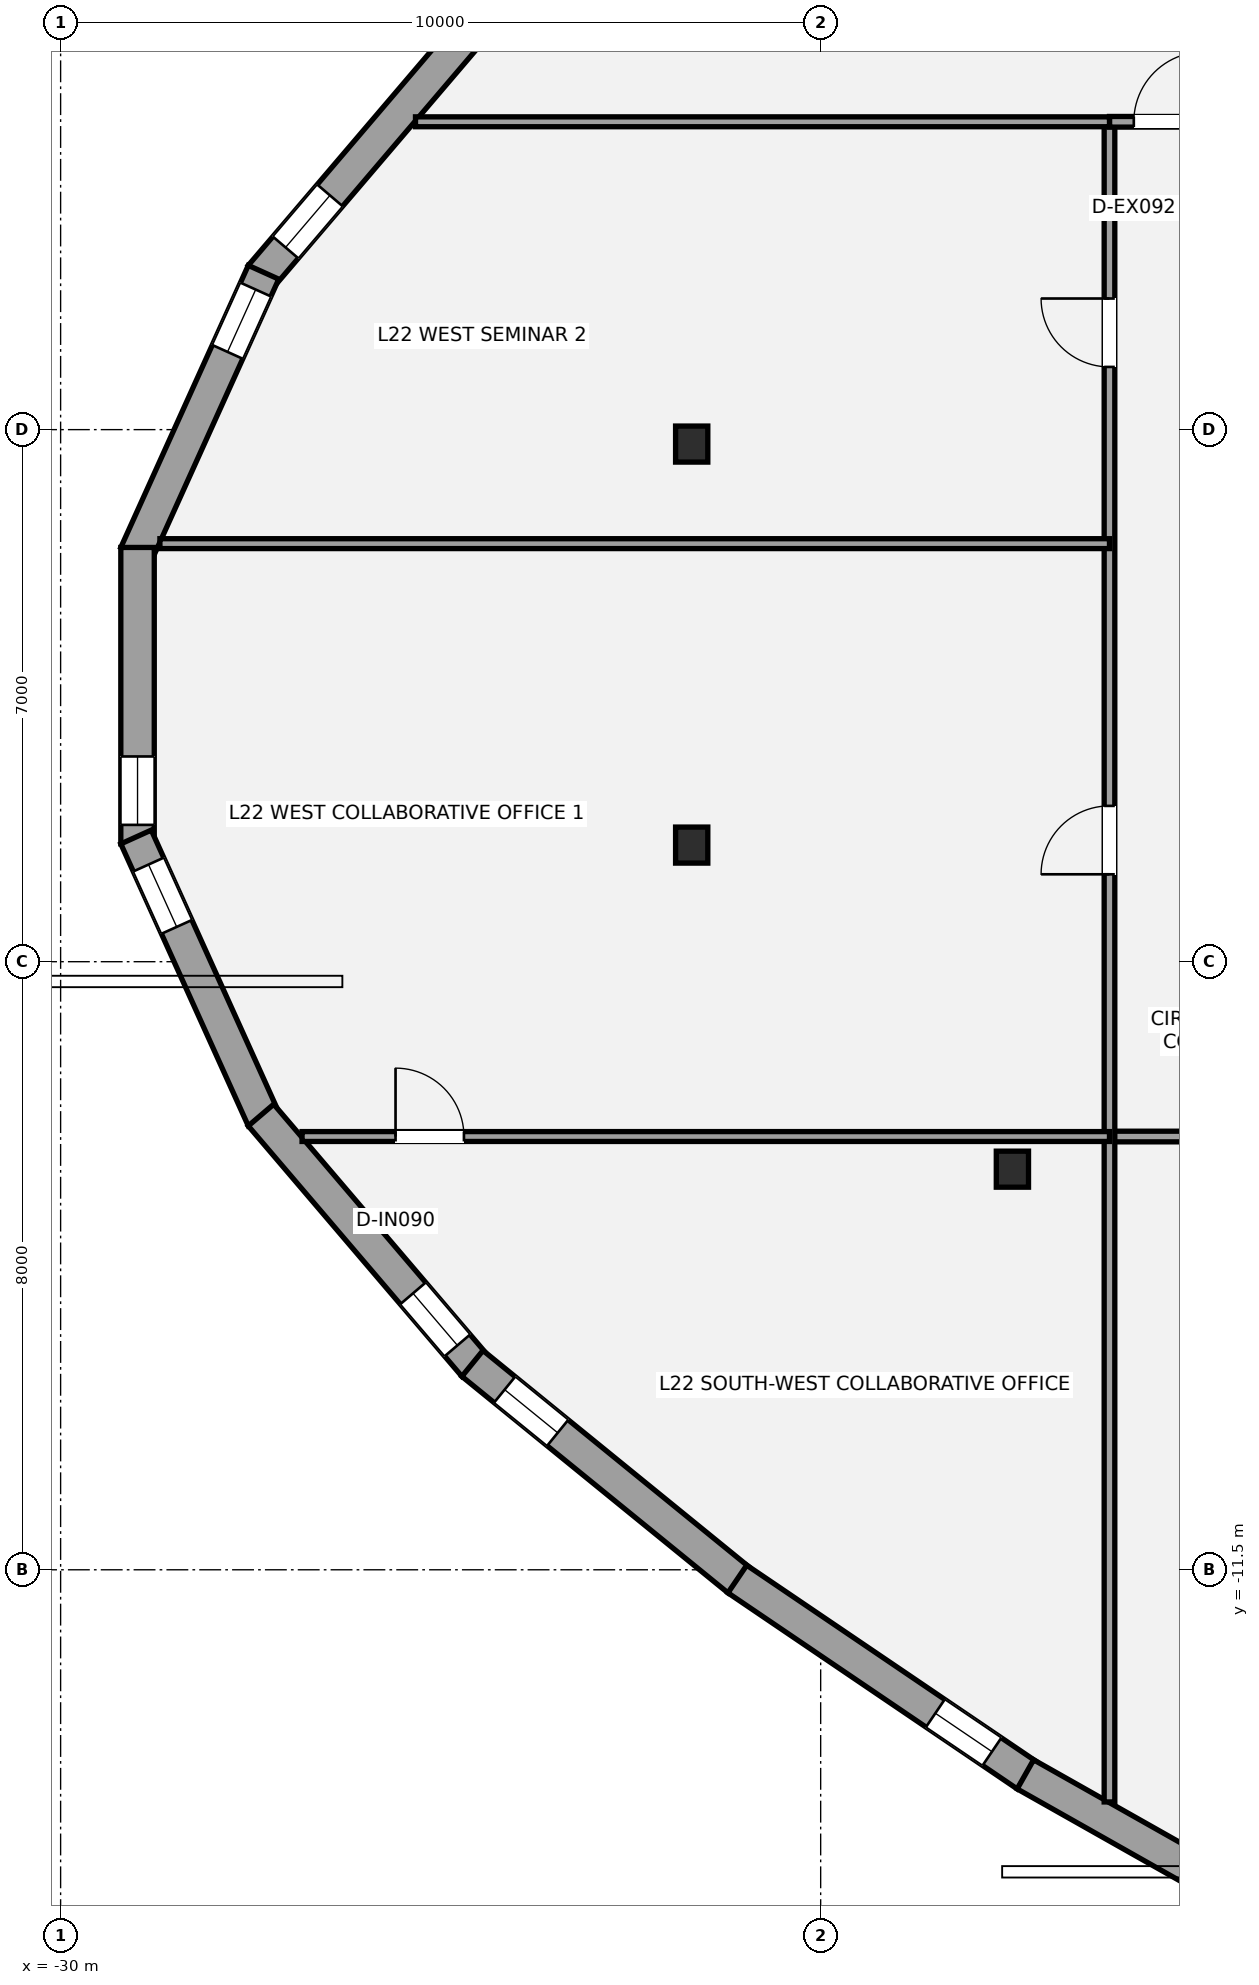
"""IFC4 building model, lengths in metres.
Left out: names, types, materials, properties, quantities, classifications, styles, units other than length and angle.
Written with IfcOpenShell. Run it as: python <this file> out.ifc"""

import sys

from ifc_helpers import new_model, si_unit, direction, frame, frame_2d, origin, origin_2d, place, context, subcontext, project, spatial, rectangle, i_section, extrude, element, fill, save


model = new_model("IFC4")
c1 = context("Model", 3, precision=1e-05, world=origin(), true_north=direction((0.0, 1.0)))
c2 = subcontext(c1, "Body", "Model", "MODEL_VIEW")
j1 = project(units=[si_unit("LENGTHUNIT", "METRE"), si_unit("PLANEANGLEUNIT", "RADIAN")], contexts=[c1])
p1 = place(None, origin())
s1 = spatial("IfcSite", under=j1, at=p1, CompositionType="ELEMENT")
p2 = place(p1, origin())
s2 = spatial("IfcBuilding", under=s1, at=p2, CompositionType="ELEMENT")
p3 = place(p2, frame((0.0, 0.0, 86.1)))
s3 = spatial("IfcBuildingStorey", under=s2, at=p3, CompositionType="ELEMENT", Elevation=86.1)
for number, where, z_axis, x_axis in (
    (1, (-21.697, 3.31, 0.0), (0.0, 0.0, 1.0), (1.0, 0.0, 0.0)),
    (2, (-21.697, -1.966, 0.0), (0.0, 0.0, 1.0), (1.0, 0.0, 0.0)),
    (3, (-17.477, -6.229, 0.0), (0.0, 0.0, 1.0), (1.0, 0.0, 0.0)),
):
    element("IfcColumn", number, at=place(p3, frame(where, z_axis=z_axis, x_axis=x_axis)), inside=s3, PredefinedType="COLUMN", context=c2, shape_type="SweptSolid", body=[
        extrude(i_section(OverallWidth=0.424, OverallDepth=0.474, WebThickness=0.048, FlangeThickness=0.077, at=origin_2d()), origin(), (0.0, 0.0, 1.0), 3.5),
    ])
p4 = place(p3, frame((-27.364, 5.518, 0.0), z_axis=(0.0, 0.0, 1.0), x_axis=(0.648913975558, 0.760861782669, 0.0)))
e4 = element("IfcWall", 4, at=p4, inside=s3, PredefinedType="STANDARD", context=c2, shape_type="SweptSolid", body=[
    extrude(rectangle(XDim=4.331, YDim=0.44, at=frame_2d((2.166, 0.0))), origin(), (0.0, 0.0, 1.0), 2.528),
])
p5 = place(p4, frame((0.498, 0.0, 0.58)))
e5 = element("IfcOpeningElement", 5, at=p5, cuts=e4, PredefinedType="OPENING", context=c2, shape_type="SweptSolid", body=[
    extrude(rectangle(XDim=0.9, YDim=1.35, at=frame_2d((0.45, 0.675))), frame((0.0, 0.23, 0.0), z_axis=(0.0, -1.0, 0.0), x_axis=(1.0, 0.0, 0.0)), (0.0, 0.0, 1.0), 0.46),
])
p6 = place(p3, frame((-29.008, 1.859, 0.0), z_axis=(0.0, 0.0, 1.0), x_axis=(0.411809988363, 0.911269736952, 0.0)))
e6 = element("IfcWall", 6, at=p6, inside=s3, PredefinedType="STANDARD", context=c2, shape_type="SweptSolid", body=[
    extrude(rectangle(XDim=4.072, YDim=0.44, at=frame_2d((2.036, 0.0))), origin(), (0.0, 0.0, 1.0), 2.528),
])
p7 = place(p6, frame((2.923, 0.0, 0.58)))
e7 = element("IfcOpeningElement", 7, at=p7, cuts=e6, PredefinedType="OPENING", context=c2, shape_type="SweptSolid", body=[
    extrude(rectangle(XDim=0.9, YDim=1.35, at=frame_2d((0.45, 0.675))), frame((0.0, 0.23, 0.0), z_axis=(0.0, -1.0, 0.0), x_axis=(1.0, 0.0, 0.0)), (0.0, 0.0, 1.0), 0.46),
])
p8 = place(p3, frame((-28.988, -1.95, 0.0), z_axis=(0.0, 0.0, 1.0), x_axis=(0.0, 1.0, 0.0)))
e8 = element("IfcWall", 8, at=p8, inside=s3, PredefinedType="STANDARD", context=c2, shape_type="SweptSolid", body=[
    extrude(rectangle(XDim=3.9, YDim=0.44, at=frame_2d((1.95, 0.0))), origin(), (0.0, 0.0, 1.0), 2.528),
])
p9 = place(p8, frame((0.25, 0.0, 0.58)))
e9 = element("IfcOpeningElement", 9, at=p9, cuts=e8, PredefinedType="OPENING", context=c2, shape_type="SweptSolid", body=[
    extrude(rectangle(XDim=0.9, YDim=1.35, at=frame_2d((0.45, 0.675))), frame((0.0, 0.23, 0.0), z_axis=(0.0, -1.0, 0.0), x_axis=(1.0, 0.0, 0.0)), (0.0, 0.0, 1.0), 0.46),
])
p10 = place(p3, frame((-27.331, -5.57, 0.0), z_axis=(0.0, 0.0, 1.0), x_axis=(-0.411809988363, 0.911269736952, 0.0)))
e10 = element("IfcWall", 10, at=p10, inside=s3, PredefinedType="STANDARD", context=c2, shape_type="SweptSolid", body=[
    extrude(rectangle(XDim=4.072, YDim=0.44, at=frame_2d((2.036, 0.0))), origin(), (0.0, 0.0, 1.0), 2.528),
])
p11 = place(p10, frame((2.774, 0.0, 0.58)))
e11 = element("IfcOpeningElement", 11, at=p11, cuts=e10, PredefinedType="OPENING", context=c2, shape_type="SweptSolid", body=[
    extrude(rectangle(XDim=0.9, YDim=1.35, at=frame_2d((0.45, 0.675))), frame((0.0, 0.23, 0.0), z_axis=(0.0, -1.0, 0.0), x_axis=(1.0, 0.0, 0.0)), (0.0, 0.0, 1.0), 0.46),
])
p12 = place(p3, frame((-24.553, -8.813, 0.0), z_axis=(0.0, 0.0, 1.0), x_axis=(-0.648913975558, 0.760861782669, 0.0)))
e12 = element("IfcWall", 12, at=p12, inside=s3, PredefinedType="STANDARD", context=c2, shape_type="SweptSolid", body=[
    extrude(rectangle(XDim=4.331, YDim=0.44, at=frame_2d((2.166, 0.0))), origin(), (0.0, 0.0, 1.0), 2.528),
])
p13 = place(p12, frame((0.349, 0.0, 0.58)))
e13 = element("IfcOpeningElement", 13, at=p13, cuts=e12, PredefinedType="OPENING", context=c2, shape_type="SweptSolid", body=[
    extrude(rectangle(XDim=0.9, YDim=1.35, at=frame_2d((0.45, 0.675))), frame((0.0, 0.23, 0.0), z_axis=(0.0, -1.0, 0.0), x_axis=(1.0, 0.0, 0.0)), (0.0, 0.0, 1.0), 0.46),
])
p14 = place(p3, frame((-21.081, -11.633, 0.0), z_axis=(0.0, 0.0, 1.0), x_axis=(-0.775728286929, 0.631067052585, 0.0)))
e14 = element("IfcWall", 14, at=p14, inside=s3, PredefinedType="STANDARD", context=c2, shape_type="SweptSolid", body=[
    extrude(rectangle(XDim=4.513, YDim=0.44, at=frame_2d((2.256, 0.0))), origin(), (0.0, 0.0, 1.0), 2.528),
])
p15 = place(p14, frame((3.067, 0.0, 0.58)))
e15 = element("IfcOpeningElement", 15, at=p15, cuts=e14, PredefinedType="OPENING", context=c2, shape_type="SweptSolid", body=[
    extrude(rectangle(XDim=0.9, YDim=1.35, at=frame_2d((0.45, 0.675))), frame((0.0, 0.23, 0.0), z_axis=(0.0, -1.0, 0.0), x_axis=(1.0, 0.0, 0.0)), (0.0, 0.0, 1.0), 0.46),
])
p16 = place(p3, frame((-17.291, -14.201, 0.0), z_axis=(0.0, 0.0, 1.0), x_axis=(-0.827777061901, 0.561057159112, 0.0)))
e16 = element("IfcWall", 16, at=p16, inside=s3, PredefinedType="STANDARD", context=c2, shape_type="SweptSolid", body=[
    extrude(rectangle(XDim=4.597, YDim=0.44, at=frame_2d((2.298, 0.0))), origin(), (0.0, 0.0, 1.0), 2.528),
])
p17 = place(p16, frame((0.55, 0.0, 0.58)))
e17 = element("IfcOpeningElement", 17, at=p17, cuts=e16, PredefinedType="OPENING", context=c2, shape_type="SweptSolid", body=[
    extrude(rectangle(XDim=0.9, YDim=1.35, at=frame_2d((0.45, 0.675))), frame((0.0, 0.23, 0.0), z_axis=(0.0, -1.0, 0.0), x_axis=(1.0, 0.0, 0.0)), (0.0, 0.0, 1.0), 0.46),
])
p18 = place(p3, frame((-13.105, -16.564, 0.0), z_axis=(0.0, 0.0, 1.0), x_axis=(-0.870732411856, 0.491757121903, 0.0)))
e18 = element("IfcWall", 18, at=p18, inside=s3, PredefinedType="STANDARD", context=c2, shape_type="SweptSolid", body=[
    extrude(rectangle(XDim=4.825, YDim=0.44, at=frame_2d((2.413, 0.0))), origin(), (0.0, 0.0, 1.0), 2.528),
])
p19 = place(p18, frame((0.448, 0.0, 0.58)))
e19 = element("IfcOpeningElement", 19, at=p19, cuts=e18, PredefinedType="OPENING", context=c2, shape_type="SweptSolid", body=[
    extrude(rectangle(XDim=0.9, YDim=1.35, at=frame_2d((0.45, 0.675))), frame((0.0, 0.23, 0.0), z_axis=(0.0, -1.0, 0.0), x_axis=(1.0, 0.0, 0.0)), (0.0, 0.0, 1.0), 0.46),
])
p20 = place(p3, frame((-16.2, -5.8, 0.0), z_axis=(0.0, 0.0, 1.0), x_axis=(1.0, 0.0, 0.0)))
e20 = element("IfcWall", 20, at=p20, inside=s3, PredefinedType="PARTITIONING", context=c2, shape_type="SweptSolid", body=[
    extrude(rectangle(XDim=32.4, YDim=0.14, at=frame_2d((16.2, 0.0))), origin(), (0.0, 0.0, 1.0), 2.763),
])
p21 = place(p20, frame((4.25, 0.0, 0.0)))
e21 = element("IfcOpeningElement", 21, at=p21, cuts=e20, PredefinedType="OPENING", context=c2, shape_type="SweptSolid", body=[
    extrude(rectangle(XDim=0.9, YDim=2.1, at=frame_2d((0.45, 1.05))), frame((0.0, 0.08, 0.0), z_axis=(0.0, -1.0, 0.0), x_axis=(1.0, 0.0, 0.0)), (0.0, 0.0, 1.0), 0.16),
])
p22 = place(p20, frame((13.15, 0.0, 0.0)))
e22 = element("IfcOpeningElement", 22, at=p22, cuts=e20, PredefinedType="OPENING", context=c2, shape_type="SweptSolid", body=[
    extrude(rectangle(XDim=1.5, YDim=2.15, at=frame_2d((0.75, 1.075))), frame((0.0, 0.08, 0.0), z_axis=(0.0, -1.0, 0.0), x_axis=(1.0, 0.0, 0.0)), (0.0, 0.0, 1.0), 0.16),
])
p23 = place(p20, frame((21.45, 0.0, 0.0)))
e23 = element("IfcOpeningElement", 23, at=p23, cuts=e20, PredefinedType="OPENING", context=c2, shape_type="SweptSolid", body=[
    extrude(rectangle(XDim=0.9, YDim=2.1, at=frame_2d((0.45, 1.05))), frame((0.0, 0.08, 0.0), z_axis=(0.0, -1.0, 0.0), x_axis=(1.0, 0.0, 0.0)), (0.0, 0.0, 1.0), 0.16),
])
p24 = place(p20, frame((28.15, 0.0, 0.0)))
e24 = element("IfcOpeningElement", 24, at=p24, cuts=e20, PredefinedType="OPENING", context=c2, shape_type="SweptSolid", body=[
    extrude(rectangle(XDim=1.5, YDim=2.15, at=frame_2d((0.75, 1.075))), frame((0.0, 0.08, 0.0), z_axis=(0.0, -1.0, 0.0), x_axis=(1.0, 0.0, 0.0)), (0.0, 0.0, 1.0), 0.16),
])
p25 = place(p3, frame((-16.2, -14.554, 0.0), z_axis=(0.0, 0.0, 1.0), x_axis=(0.0, 1.0, 0.0)))
e25 = element("IfcWall", 25, at=p25, inside=s3, PredefinedType="PARTITIONING", context=c2, shape_type="SweptSolid", body=[
    extrude(rectangle(XDim=22.104, YDim=0.14, at=frame_2d((11.052, 0.0))), origin(), (0.0, 0.0, 1.0), 2.751),
])
p26 = place(p25, frame((12.204, 0.0, 0.0)))
e26 = element("IfcOpeningElement", 26, at=p26, cuts=e25, PredefinedType="OPENING", context=c2, shape_type="SweptSolid", body=[
    extrude(rectangle(XDim=0.9, YDim=2.1, at=frame_2d((0.45, 1.05))), frame((0.0, 0.08, 0.0), z_axis=(0.0, -1.0, 0.0), x_axis=(1.0, 0.0, 0.0)), (0.0, 0.0, 1.0), 0.16),
])
p27 = place(p25, frame((18.879, 0.0, 0.0)))
e27 = element("IfcOpeningElement", 27, at=p27, cuts=e25, PredefinedType="OPENING", context=c2, shape_type="SweptSolid", body=[
    extrude(rectangle(XDim=0.9, YDim=2.1, at=frame_2d((0.45, 1.05))), frame((0.0, 0.08, 0.0), z_axis=(0.0, -1.0, 0.0), x_axis=(1.0, 0.0, 0.0)), (0.0, 0.0, 1.0), 0.16),
])
p28 = place(p3, frame((-16.2, 7.55, 0.0), z_axis=(0.0, 0.0, 1.0), x_axis=(1.0, 0.0, 0.0)))
e28 = element("IfcWall", 28, at=p28, inside=s3, PredefinedType="PARTITIONING", context=c2, shape_type="SweptSolid", body=[
    extrude(rectangle(XDim=2.3, YDim=0.14, at=frame_2d((1.15, 0.0))), origin(), (0.0, 0.0, 1.0), 2.763),
])
p29 = place(p28, frame((0.32, 0.0, 0.0)))
e29 = element("IfcOpeningElement", 29, at=p29, cuts=e28, PredefinedType="OPENING", context=c2, shape_type="SweptSolid", body=[
    extrude(rectangle(XDim=0.92, YDim=2.15, at=frame_2d((0.46, 1.075))), frame((0.0, 0.08, 0.0), z_axis=(0.0, -1.0, 0.0), x_axis=(1.0, 0.0, 0.0)), (0.0, 0.0, 1.0), 0.16),
])
p30 = place(p3, frame((-25.331, 7.55, 0.0), z_axis=(0.0, 0.0, 1.0), x_axis=(1.0, 0.0, 0.0)))
e30 = element("IfcWall", 30, at=p30, inside=s3, PredefinedType="PARTITIONING", context=c2, shape_type="SweptSolid", body=[
    extrude(rectangle(XDim=9.131, YDim=0.13, at=frame_2d((4.565, 0.0))), origin(), (0.0, 0.0, 1.0), 2.763),
])
p31 = place(p3, frame((-26.823, -5.8, 0.0), z_axis=(0.0, 0.0, 1.0), x_axis=(1.0, 0.0, 0.0)))
e31 = element("IfcWall", 31, at=p31, inside=s3, PredefinedType="PARTITIONING", context=c2, shape_type="SweptSolid", body=[
    extrude(rectangle(XDim=10.624, YDim=0.13, at=frame_2d((5.312, 0.0))), origin(), (0.0, 0.0, 1.0), 2.688),
])
p32 = place(p31, frame((1.23, 0.0, 0.0)))
e32 = element("IfcOpeningElement", 32, at=p32, cuts=e31, PredefinedType="OPENING", context=c2, shape_type="SweptSolid", body=[
    extrude(rectangle(XDim=0.9, YDim=2.1, at=frame_2d((0.45, 1.05))), frame((0.0, 0.075, 0.0), z_axis=(0.0, -1.0, 0.0), x_axis=(1.0, 0.0, 0.0)), (0.0, 0.0, 1.0), 0.15),
])
p33 = place(p3, frame((-28.694, 2.0, 0.0), z_axis=(0.0, 0.0, 1.0), x_axis=(1.0, 0.0, 0.0)))
e33 = element("IfcWall", 33, at=p33, inside=s3, PredefinedType="PARTITIONING", context=c2, shape_type="SweptSolid", body=[
    extrude(rectangle(XDim=12.494, YDim=0.13, at=frame_2d((6.247, 0.0))), origin(), (0.0, 0.0, 1.0), 2.751),
])
p34 = place(p5, origin())
e34 = element("IfcWindow", 34, at=p34, inside=s3, PartitioningType="SINGLE_PANEL", PredefinedType="WINDOW", context=c2, shape_type="SweptSolid", body=[
    extrude(rectangle(XDim=0.9, YDim=1.35, at=frame_2d((0.45, 0.675))), frame((0.0, -0.01, 0.0), z_axis=(0.0, -1.0, 0.0), x_axis=(1.0, 0.0, 0.0)), (0.0, 0.0, 1.0), 0.06),
])
fill(e5, e34)
p35 = place(p7, origin())
e35 = element("IfcWindow", 35, at=p35, inside=s3, PartitioningType="SINGLE_PANEL", PredefinedType="WINDOW", context=c2, shape_type="SweptSolid", body=[
    extrude(rectangle(XDim=0.9, YDim=1.35, at=frame_2d((0.45, 0.675))), frame((0.0, -0.01, 0.0), z_axis=(0.0, -1.0, 0.0), x_axis=(1.0, 0.0, 0.0)), (0.0, 0.0, 1.0), 0.06),
])
fill(e7, e35)
p36 = place(p9, origin())
e36 = element("IfcWindow", 36, at=p36, inside=s3, PartitioningType="SINGLE_PANEL", PredefinedType="WINDOW", context=c2, shape_type="SweptSolid", body=[
    extrude(rectangle(XDim=0.9, YDim=1.35, at=frame_2d((0.45, 0.675))), frame((0.0, -0.01, 0.0), z_axis=(0.0, -1.0, 0.0), x_axis=(1.0, 0.0, 0.0)), (0.0, 0.0, 1.0), 0.06),
])
fill(e9, e36)
p37 = place(p11, origin())
e37 = element("IfcWindow", 37, at=p37, inside=s3, PartitioningType="SINGLE_PANEL", PredefinedType="WINDOW", context=c2, shape_type="SweptSolid", body=[
    extrude(rectangle(XDim=0.9, YDim=1.35, at=frame_2d((0.45, 0.675))), frame((0.0, -0.01, 0.0), z_axis=(0.0, -1.0, 0.0), x_axis=(1.0, 0.0, 0.0)), (0.0, 0.0, 1.0), 0.06),
])
fill(e11, e37)
p38 = place(p13, origin())
e38 = element("IfcWindow", 38, at=p38, inside=s3, PartitioningType="SINGLE_PANEL", PredefinedType="WINDOW", context=c2, shape_type="SweptSolid", body=[
    extrude(rectangle(XDim=0.9, YDim=1.35, at=frame_2d((0.45, 0.675))), frame((0.0, -0.01, 0.0), z_axis=(0.0, -1.0, 0.0), x_axis=(1.0, 0.0, 0.0)), (0.0, 0.0, 1.0), 0.06),
])
fill(e13, e38)
p39 = place(p15, origin())
e39 = element("IfcWindow", 39, at=p39, inside=s3, PartitioningType="SINGLE_PANEL", PredefinedType="WINDOW", context=c2, shape_type="SweptSolid", body=[
    extrude(rectangle(XDim=0.9, YDim=1.35, at=frame_2d((0.45, 0.675))), frame((0.0, -0.01, 0.0), z_axis=(0.0, -1.0, 0.0), x_axis=(1.0, 0.0, 0.0)), (0.0, 0.0, 1.0), 0.06),
])
fill(e15, e39)
p40 = place(p17, origin())
e40 = element("IfcWindow", 40, at=p40, inside=s3, PartitioningType="SINGLE_PANEL", PredefinedType="WINDOW", context=c2, shape_type="SweptSolid", body=[
    extrude(rectangle(XDim=0.9, YDim=1.35, at=frame_2d((0.45, 0.675))), frame((0.0, -0.01, 0.0), z_axis=(0.0, -1.0, 0.0), x_axis=(1.0, 0.0, 0.0)), (0.0, 0.0, 1.0), 0.06),
])
fill(e17, e40)
p41 = place(p29, origin())
e41 = element("IfcDoor", 41, at=p41, inside=s3, OperationType="SINGLE_SWING_RIGHT", PredefinedType="DOOR", context=c2, shape_type="SweptSolid", body=[
    extrude(rectangle(XDim=0.92, YDim=2.15, at=frame_2d((0.46, 1.075))), frame((0.0, 0.025, 0.0), z_axis=(0.0, -1.0, 0.0), x_axis=(1.0, 0.0, 0.0)), (0.0, 0.0, 1.0), 0.05),
])
fill(e29, e41)
p42 = place(p32, origin())
e42 = element("IfcDoor", 42, at=p42, inside=s3, OperationType="SINGLE_SWING_LEFT", PredefinedType="DOOR", context=c2, shape_type="SweptSolid", body=[
    extrude(rectangle(XDim=0.9, YDim=2.1, at=frame_2d((0.45, 1.05))), frame((0.0, 0.025, 0.0), z_axis=(0.0, -1.0, 0.0), x_axis=(1.0, 0.0, 0.0)), (0.0, 0.0, 1.0), 0.05),
])
fill(e32, e42)
p43 = place(p26, origin())
e43 = element("IfcDoor", 43, at=p43, inside=s3, OperationType="SINGLE_SWING_LEFT", PredefinedType="DOOR", context=c2, shape_type="SweptSolid", body=[
    extrude(rectangle(XDim=0.9, YDim=2.1, at=frame_2d((0.45, 1.05))), frame((0.0, 0.025, 0.0), z_axis=(0.0, -1.0, 0.0), x_axis=(1.0, 0.0, 0.0)), (0.0, 0.0, 1.0), 0.05),
])
fill(e26, e43)
p44 = place(p27, origin())
e44 = element("IfcDoor", 44, at=p44, inside=s3, OperationType="SINGLE_SWING_RIGHT", PredefinedType="DOOR", context=c2, shape_type="SweptSolid", body=[
    extrude(rectangle(XDim=0.9, YDim=2.1, at=frame_2d((0.45, 1.05))), frame((0.0, 0.025, 0.0), z_axis=(0.0, -1.0, 0.0), x_axis=(1.0, 0.0, 0.0)), (0.0, 0.0, 1.0), 0.05),
])
fill(e27, e44)
save(model, sys.argv[1])
